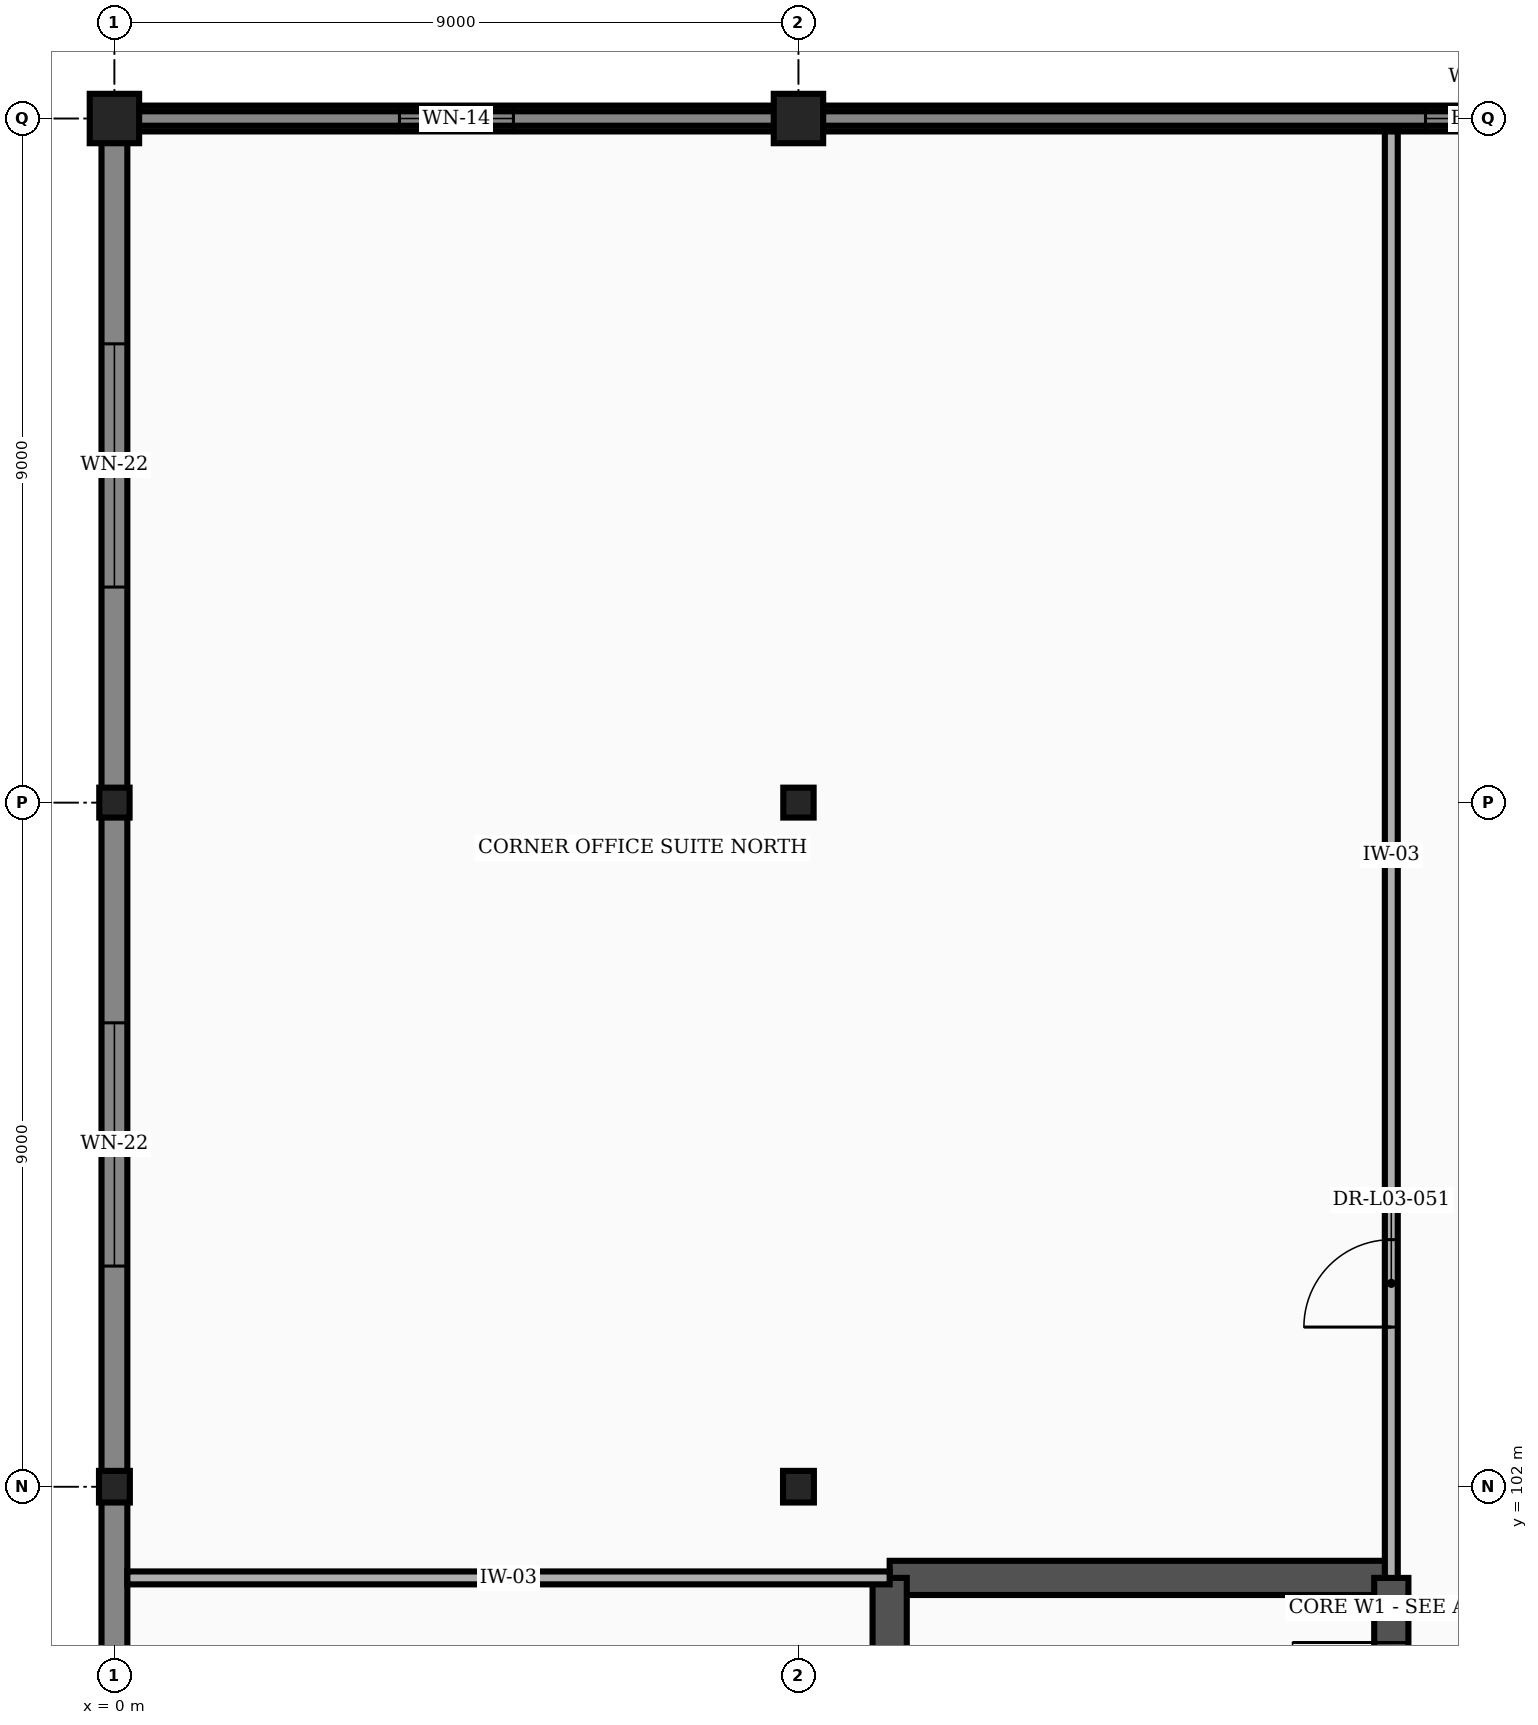
"""IFC4 building model, lengths in metres.
Left out: names, types, materials, properties, quantities, classifications, styles, units other than length and angle.
Written with IfcOpenShell. Run it as: python <this file> out.ifc"""

import sys

from ifc_helpers import new_model, si_unit, direction, frame, frame_2d, origin, origin_2d, place, context, subcontext, project, spatial, rectangle, i_section, extrude, element, fill, save


model = new_model("IFC4")
c1 = context("Model", 3, precision=1e-05, world=origin(), true_north=direction((0.0, 1.0)))
c2 = subcontext(c1, "Body", "Model", "MODEL_VIEW")
j1 = project(units=[si_unit("LENGTHUNIT", "METRE"), si_unit("PLANEANGLEUNIT", "RADIAN")], contexts=[c1])
p1 = place(None, origin())
s1 = spatial("IfcSite", under=j1, at=p1, CompositionType="ELEMENT")
p2 = place(p1, origin())
s2 = spatial("IfcBuilding", under=s1, at=p2, CompositionType="ELEMENT")
p3 = place(p2, frame((0.0, 0.0, 16.8)))
s3 = spatial("IfcBuildingStorey", under=s2, at=p3, CompositionType="ELEMENT", Elevation=16.8)
p4 = place(p3, frame((0.0, 102.0, 0.0), z_axis=(0.0, 0.0, 1.0), x_axis=(1.0, 0.0, 0.0)))
e1 = element("IfcColumn", 1, at=p4, inside=s3, PredefinedType="COLUMN", context=c2, shape_type="SweptSolid", body=[
    extrude(i_section(OverallWidth=0.406, OverallDepth=0.416, WebThickness=0.03, FlangeThickness=0.048, at=origin_2d()), origin(), (0.0, 0.0, 1.0), 4.8),
])
p5 = place(p3, frame((0.0, 111.0, 0.0), z_axis=(0.0, 0.0, 1.0), x_axis=(1.0, 0.0, 0.0)))
e2 = element("IfcColumn", 2, at=p5, inside=s3, PredefinedType="COLUMN", context=c2, shape_type="SweptSolid", body=[
    extrude(i_section(OverallWidth=0.399, OverallDepth=0.394, WebThickness=0.023, FlangeThickness=0.037, at=origin_2d()), origin(), (0.0, 0.0, 1.0), 4.8),
])
p6 = place(p3, frame((0.0, 120.0, 0.0), z_axis=(0.0, 0.0, 1.0), x_axis=(1.0, 0.0, 0.0)))
e3 = element("IfcColumn", 3, at=p6, inside=s3, PredefinedType="COLUMN", context=c2, shape_type="SweptSolid", body=[
    extrude(rectangle(XDim=0.65, YDim=0.65, at=origin_2d()), origin(), (0.0, 0.0, 1.0), 4.8),
])
p7 = place(p3, frame((9.0, 102.0, 0.0), z_axis=(0.0, 0.0, 1.0), x_axis=(1.0, 0.0, 0.0)))
e4 = element("IfcColumn", 4, at=p7, inside=s3, PredefinedType="COLUMN", context=c2, shape_type="SweptSolid", body=[
    extrude(i_section(OverallWidth=0.406, OverallDepth=0.416, WebThickness=0.03, FlangeThickness=0.048, at=origin_2d()), origin(), (0.0, 0.0, 1.0), 4.8),
])
p8 = place(p3, frame((9.0, 111.0, 0.0), z_axis=(0.0, 0.0, 1.0), x_axis=(1.0, 0.0, 0.0)))
e5 = element("IfcColumn", 5, at=p8, inside=s3, PredefinedType="COLUMN", context=c2, shape_type="SweptSolid", body=[
    extrude(i_section(OverallWidth=0.399, OverallDepth=0.394, WebThickness=0.023, FlangeThickness=0.037, at=origin_2d()), origin(), (0.0, 0.0, 1.0), 4.8),
])
p9 = place(p3, frame((9.0, 120.0, 0.0), z_axis=(0.0, 0.0, 1.0), x_axis=(1.0, 0.0, 0.0)))
e6 = element("IfcColumn", 6, at=p9, inside=s3, PredefinedType="COLUMN", context=c2, shape_type="SweptSolid", body=[
    extrude(rectangle(XDim=0.65, YDim=0.65, at=origin_2d()), origin(), (0.0, 0.0, 1.0), 4.8),
])
p10 = place(p3, frame((0.317, 120.0, 0.0), z_axis=(0.0, 0.0, 1.0), x_axis=(1.0, 0.0, 0.0)))
e7 = element("IfcWall", 7, at=p10, inside=s3, PredefinedType="STANDARD", context=c2, shape_type="SweptSolid", body=[
    extrude(rectangle(XDim=8.366, YDim=0.34, at=frame_2d((4.183, 0.0))), origin(), (0.0, 0.0, 1.0), 4.048),
])
p11 = place(p10, frame((3.433, 0.0, 0.85)))
e8 = element("IfcOpeningElement", 8, at=p11, cuts=e7, PredefinedType="OPENING", context=c2, shape_type="SweptSolid", body=[
    extrude(rectangle(XDim=1.5, YDim=1.8, at=frame_2d((0.75, 0.9))), frame((0.0, 0.182, 0.0), z_axis=(0.0, -1.0, 0.0), x_axis=(1.0, 0.0, 0.0)), (0.0, 0.0, 1.0), 0.364),
])
p12 = place(p3, frame((9.317, 120.0, 0.0), z_axis=(0.0, 0.0, 1.0), x_axis=(1.0, 0.0, 0.0)))
e9 = element("IfcWall", 9, at=p12, inside=s3, PredefinedType="STANDARD", context=c2, shape_type="SweptSolid", body=[
    extrude(rectangle(XDim=17.366, YDim=0.34, at=frame_2d((8.683, 0.0))), origin(), (0.0, 0.0, 1.0), 4.048),
])
p13 = place(p12, frame((7.933, 0.0, 0.85)))
e10 = element("IfcOpeningElement", 10, at=p13, cuts=e9, PredefinedType="OPENING", context=c2, shape_type="SweptSolid", body=[
    extrude(rectangle(XDim=1.5, YDim=1.8, at=frame_2d((0.75, 0.9))), frame((0.0, 0.182, 0.0), z_axis=(0.0, -1.0, 0.0), x_axis=(1.0, 0.0, 0.0)), (0.0, 0.0, 1.0), 0.364),
])
p14 = place(p3, frame((0.0, 84.194, 0.0), z_axis=(0.0, 0.0, 1.0), x_axis=(0.0, 1.0, 0.0)))
e11 = element("IfcWall", 11, at=p14, inside=s3, PredefinedType="STANDARD", context=c2, shape_type="SweptSolid", body=[
    extrude(rectangle(XDim=17.612, YDim=0.34, at=frame_2d((8.806, 0.0))), origin(), (0.0, 0.0, 1.0), 3.943),
])
p15 = place(p14, frame((7.206, 0.0, 0.85)))
e12 = element("IfcOpeningElement", 12, at=p15, cuts=e11, PredefinedType="OPENING", context=c2, shape_type="SweptSolid", body=[
    extrude(rectangle(XDim=3.2, YDim=2.2, at=frame_2d((1.6, 1.1))), frame((0.0, 0.182, 0.0), z_axis=(0.0, -1.0, 0.0), x_axis=(1.0, 0.0, 0.0)), (0.0, 0.0, 1.0), 0.364),
])
p16 = place(p3, frame((0.0, 102.194, 0.0), z_axis=(0.0, 0.0, 1.0), x_axis=(0.0, 1.0, 0.0)))
e13 = element("IfcWall", 13, at=p16, inside=s3, PredefinedType="STANDARD", context=c2, shape_type="SweptSolid", body=[
    extrude(rectangle(XDim=8.617, YDim=0.34, at=frame_2d((4.309, 0.0))), origin(), (0.0, 0.0, 1.0), 4.555),
])
p17 = place(p16, frame((2.709, 0.0, 0.85)))
e14 = element("IfcOpeningElement", 14, at=p17, cuts=e13, PredefinedType="OPENING", context=c2, shape_type="SweptSolid", body=[
    extrude(rectangle(XDim=3.2, YDim=2.2, at=frame_2d((1.6, 1.1))), frame((0.0, 0.182, 0.0), z_axis=(0.0, -1.0, 0.0), x_axis=(1.0, 0.0, 0.0)), (0.0, 0.0, 1.0), 0.364),
])
p18 = place(p3, frame((0.0, 111.189, 0.0), z_axis=(0.0, 0.0, 1.0), x_axis=(0.0, 1.0, 0.0)))
e15 = element("IfcWall", 15, at=p18, inside=s3, PredefinedType="STANDARD", context=c2, shape_type="SweptSolid", body=[
    extrude(rectangle(XDim=8.494, YDim=0.34, at=frame_2d((4.247, 0.0))), origin(), (0.0, 0.0, 1.0), 4.048),
])
p19 = place(p18, frame((2.647, 0.0, 0.85)))
e16 = element("IfcOpeningElement", 16, at=p19, cuts=e15, PredefinedType="OPENING", context=c2, shape_type="SweptSolid", body=[
    extrude(rectangle(XDim=3.2, YDim=2.2, at=frame_2d((1.6, 1.1))), frame((0.0, 0.182, 0.0), z_axis=(0.0, -1.0, 0.0), x_axis=(1.0, 0.0, 0.0)), (0.0, 0.0, 1.0), 0.364),
])
p20 = place(p3, frame((0.0, 120.0, 4.8), z_axis=(0.0, 0.0, 1.0), x_axis=(1.0, 0.0, 0.0)))
e17 = element("IfcWall", 17, at=p20, inside=s3, PredefinedType="PARAPET", context=c2, shape_type="SweptSolid", body=[
    extrude(rectangle(XDim=45.0, YDim=0.19, at=frame_2d((22.5, 0.0))), origin(), (0.0, 0.0, 1.0), 1.2),
])
p21 = place(p3, frame((10.2, 100.8, 0.0), z_axis=(0.0, 0.0, 1.0), x_axis=(1.0, 0.0, 0.0)))
e18 = element("IfcWall", 18, at=p21, inside=s3, PredefinedType="SHEAR", context=c2, shape_type="SweptSolid", body=[
    extrude(rectangle(XDim=6.6, YDim=0.45, at=frame_2d((3.3, 0.0))), origin(), (0.0, 0.0, 1.0), 4.555),
])
p22 = place(p3, frame((10.2, 85.2, 0.0), z_axis=(0.0, 0.0, 1.0), x_axis=(0.0, 1.0, 0.0)))
e19 = element("IfcWall", 19, at=p22, inside=s3, PredefinedType="SHEAR", context=c2, shape_type="SweptSolid", body=[
    extrude(rectangle(XDim=15.6, YDim=0.45, at=frame_2d((7.8, 0.0))), origin(), (0.0, 0.0, 1.0), 4.555),
])
p23 = place(p3, frame((16.8, 91.215, 0.0), z_axis=(0.0, 0.0, 1.0), x_axis=(0.0, 1.0, 0.0)))
e20 = element("IfcWall", 20, at=p23, inside=s3, PredefinedType="SHEAR", context=c2, shape_type="SweptSolid", body=[
    extrude(rectangle(XDim=9.585, YDim=0.45, at=frame_2d((4.792, 0.0))), origin(), (0.0, 0.0, 1.0), 4.555),
])
p24 = place(p23, frame((7.435, 0.0, 0.0)))
e21 = element("IfcOpeningElement", 21, at=p24, cuts=e20, PredefinedType="OPENING", context=c2, shape_type="SweptSolid", body=[
    extrude(rectangle(XDim=1.3, YDim=2.2, at=frame_2d((0.65, 1.1))), frame((0.0, 0.237, 0.0), z_axis=(0.0, -1.0, 0.0), x_axis=(1.0, 0.0, 0.0)), (0.0, 0.0, 1.0), 0.474),
])
p25 = place(p3, frame((0.17, 100.8, 0.0), z_axis=(0.0, 0.0, 1.0), x_axis=(1.0, 0.0, 0.0)))
e22 = element("IfcWall", 22, at=p25, inside=s3, PredefinedType="PARTITIONING", context=c2, shape_type="SweptSolid", body=[
    extrude(rectangle(XDim=10.03, YDim=0.17, at=frame_2d((5.015, 0.0))), origin(), (0.0, 0.0, 1.0), 4.555),
])
p26 = place(p3, frame((16.8, 100.8, 0.0), z_axis=(0.0, 0.0, 1.0), x_axis=(0.0, 1.0, 0.0)))
e23 = element("IfcWall", 23, at=p26, inside=s3, PredefinedType="PARTITIONING", context=c2, shape_type="SweptSolid", body=[
    extrude(rectangle(XDim=19.03, YDim=0.17, at=frame_2d((9.515, 0.0))), origin(), (0.0, 0.0, 1.0), 4.555),
])
p27 = place(p26, frame((3.3, 0.0, 0.0)))
e24 = element("IfcOpeningElement", 24, at=p27, cuts=e23, PredefinedType="OPENING", context=c2, shape_type="SweptSolid", body=[
    extrude(rectangle(XDim=1.15, YDim=2.15, at=frame_2d((0.575, 1.075))), frame((0.0, 0.097, 0.0), z_axis=(0.0, -1.0, 0.0), x_axis=(1.0, 0.0, 0.0)), (0.0, 0.0, 1.0), 0.194),
])
p28 = place(p11, origin())
e25 = element("IfcWindow", 25, at=p28, inside=s3, PartitioningType="SINGLE_PANEL", PredefinedType="WINDOW", context=c2, shape_type="SweptSolid", body=[
    extrude(rectangle(XDim=1.5, YDim=1.8, at=frame_2d((0.75, 0.9))), frame((0.0, 0.03, 0.0), z_axis=(0.0, -1.0, 0.0), x_axis=(1.0, 0.0, 0.0)), (0.0, 0.0, 1.0), 0.06),
])
fill(e8, e25)
p29 = place(p13, origin())
e26 = element("IfcWindow", 26, at=p29, inside=s3, PartitioningType="SINGLE_PANEL", PredefinedType="WINDOW", context=c2, shape_type="SweptSolid", body=[
    extrude(rectangle(XDim=1.5, YDim=1.8, at=frame_2d((0.75, 0.9))), frame((0.0, 0.03, 0.0), z_axis=(0.0, -1.0, 0.0), x_axis=(1.0, 0.0, 0.0)), (0.0, 0.0, 1.0), 0.06),
])
fill(e10, e26)
p30 = place(p17, origin())
e27 = element("IfcWindow", 27, at=p30, inside=s3, PartitioningType="SINGLE_PANEL", PredefinedType="WINDOW", context=c2, shape_type="SweptSolid", body=[
    extrude(rectangle(XDim=3.2, YDim=2.2, at=frame_2d((1.6, 1.1))), frame((0.0, 0.03, 0.0), z_axis=(0.0, -1.0, 0.0), x_axis=(1.0, 0.0, 0.0)), (0.0, 0.0, 1.0), 0.06),
])
fill(e14, e27)
p31 = place(p19, origin())
e28 = element("IfcWindow", 28, at=p31, inside=s3, PartitioningType="SINGLE_PANEL", PredefinedType="WINDOW", context=c2, shape_type="SweptSolid", body=[
    extrude(rectangle(XDim=3.2, YDim=2.2, at=frame_2d((1.6, 1.1))), frame((0.0, 0.03, 0.0), z_axis=(0.0, -1.0, 0.0), x_axis=(1.0, 0.0, 0.0)), (0.0, 0.0, 1.0), 0.06),
])
fill(e16, e28)
p32 = place(p24, origin())
e29 = element("IfcDoor", 29, at=p32, inside=s3, OperationType="SINGLE_SWING_RIGHT", PredefinedType="DOOR", context=c2, shape_type="SweptSolid", body=[
    extrude(rectangle(XDim=1.3, YDim=2.2, at=frame_2d((0.65, 1.1))), frame((0.0, 0.025, 0.0), z_axis=(0.0, -1.0, 0.0), x_axis=(1.0, 0.0, 0.0)), (0.0, 0.0, 1.0), 0.05),
])
fill(e21, e29)
p33 = place(p27, origin())
e30 = element("IfcDoor", 30, at=p33, inside=s3, OperationType="SINGLE_SWING_LEFT", PredefinedType="DOOR", context=c2, shape_type="SweptSolid", body=[
    extrude(rectangle(XDim=1.15, YDim=2.15, at=frame_2d((0.575, 1.075))), frame((0.0, 0.025, 0.0), z_axis=(0.0, -1.0, 0.0), x_axis=(1.0, 0.0, 0.0)), (0.0, 0.0, 1.0), 0.05),
])
fill(e24, e30)
save(model, sys.argv[1])
